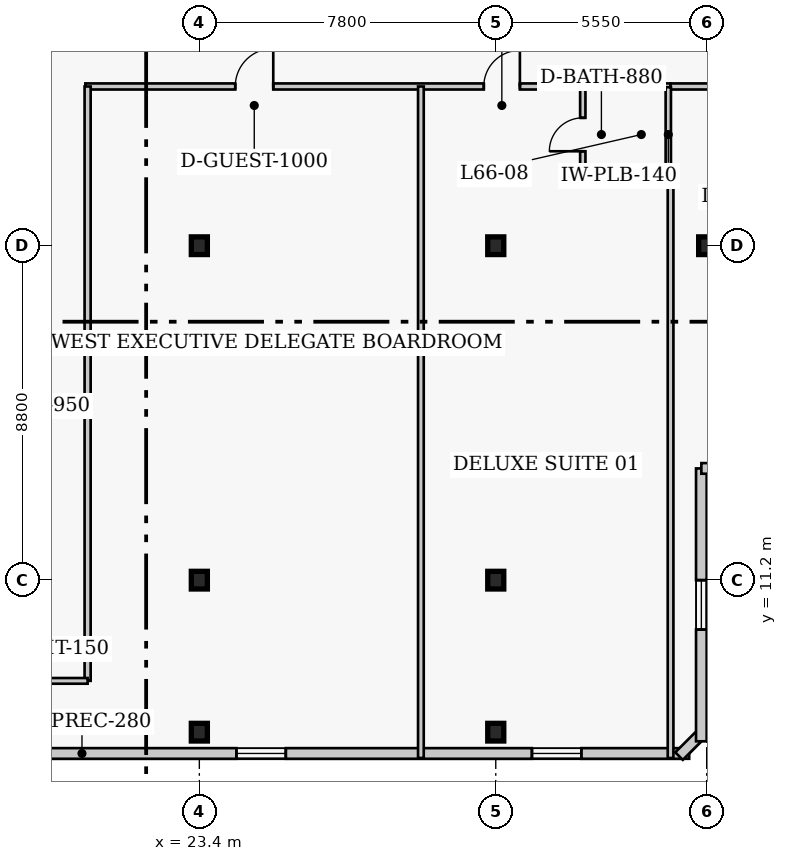
"""IFC4 building model, lengths in metres.
Left out: names, types, materials, properties, quantities, classifications, styles, units other than length and angle.
Written with IfcOpenShell. Run it as: python <this file> out.ifc"""

import sys

from ifc_helpers import new_model, si_unit, direction, frame, frame_2d, origin, origin_2d, place, context, subcontext, project, spatial, rectangle, i_section, extrude, element, fill, save


model = new_model("IFC4")
c1 = context("Model", 3, precision=1e-05, world=origin(), true_north=direction((0.0, 1.0)))
c2 = subcontext(c1, "Body", "Model", "MODEL_VIEW")
j1 = project(units=[si_unit("LENGTHUNIT", "METRE"), si_unit("PLANEANGLEUNIT", "RADIAN")], contexts=[c1])
p1 = place(None, origin())
s1 = spatial("IfcSite", under=j1, at=p1, CompositionType="ELEMENT")
p2 = place(p1, origin())
s2 = spatial("IfcBuilding", under=s1, at=p2, CompositionType="ELEMENT")
p3 = place(p2, frame((0.0, 0.0, 265.4)))
s3 = spatial("IfcBuildingStorey", under=s2, at=p3, CompositionType="ELEMENT", Elevation=265.4)
for number, where, z_axis, x_axis in (
    (1, (23.4, 11.2, 0.0), (0.0, 0.0, 1.0), (1.0, 0.0, 0.0)),
    (2, (23.4, 20.0, 0.0), (0.0, 0.0, 1.0), (1.0, 0.0, 0.0)),
    (3, (31.2, 11.2, 0.0), (0.0, 0.0, 1.0), (1.0, 0.0, 0.0)),
    (4, (31.2, 20.0, 0.0), (0.0, 0.0, 1.0), (1.0, 0.0, 0.0)),
    (5, (36.75, 20.0, 0.0), (0.0, 0.0, 1.0), (1.0, 0.0, 0.0)),
    (6, (23.4, 7.2, 0.0), (0.0, 0.0, 1.0), (1.0, 0.0, 0.0)),
    (7, (31.2, 7.2, 0.0), (0.0, 0.0, 1.0), (1.0, 0.0, 0.0)),
):
    element("IfcColumn", number, at=place(p3, frame(where, z_axis=z_axis, x_axis=x_axis)), inside=s3, PredefinedType="COLUMN", context=c2, shape_type="SweptSolid", body=[
        extrude(i_section(OverallWidth=0.422, OverallDepth=0.465, WebThickness=0.045, FlangeThickness=0.073, FilletRadius=0.017, at=origin_2d()), origin(), (0.0, 0.0, 1.0), 4.0),
    ])
p4 = place(p3, frame((11.46, 6.64, 0.0), z_axis=(0.0, 0.0, 1.0), x_axis=(1.0, 0.0, 0.0)))
e8 = element("IfcWall", 8, at=p4, inside=s3, PredefinedType="SOLIDWALL", context=c2, shape_type="SweptSolid", body=[
    extrude(rectangle(XDim=24.83, YDim=0.28, at=frame_2d((12.415, 0.0))), origin(), (0.0, 0.0, 1.0), 3.76),
])
p5 = place(p4, frame((3.488, 0.0, 0.85)))
e9 = element("IfcOpeningElement", 9, at=p5, cuts=e8, PredefinedType="OPENING", context=c2, shape_type="SweptSolid", body=[
    extrude(rectangle(XDim=1.3, YDim=1.7, at=frame_2d((0.65, 0.85))), frame((0.0, 0.15, 0.0), z_axis=(0.0, -1.0, 0.0), x_axis=(1.0, 0.0, 0.0)), (0.0, 0.0, 1.0), 0.3),
])
p6 = place(p4, frame((12.915, 0.0, 0.85)))
e10 = element("IfcOpeningElement", 10, at=p6, cuts=e8, PredefinedType="OPENING", context=c2, shape_type="SweptSolid", body=[
    extrude(rectangle(XDim=1.3, YDim=1.7, at=frame_2d((0.65, 0.85))), frame((0.0, 0.15, 0.0), z_axis=(0.0, -1.0, 0.0), x_axis=(1.0, 0.0, 0.0)), (0.0, 0.0, 1.0), 0.3),
])
p7 = place(p4, frame((20.692, 0.0, 0.85)))
e11 = element("IfcOpeningElement", 11, at=p7, cuts=e8, PredefinedType="OPENING", context=c2, shape_type="SweptSolid", body=[
    extrude(rectangle(XDim=1.3, YDim=1.7, at=frame_2d((0.65, 0.85))), frame((0.0, 0.15, 0.0), z_axis=(0.0, -1.0, 0.0), x_axis=(1.0, 0.0, 0.0)), (0.0, 0.0, 1.0), 0.3),
])
p8 = place(p3, frame((36.023, 6.571, 0.0), z_axis=(0.0, 0.0, 1.0), x_axis=(0.707106781187, 0.707106781187, 0.0)))
e12 = element("IfcWall", 12, at=p8, inside=s3, PredefinedType="SOLIDWALL", context=c2, shape_type="SweptSolid", body=[
    extrude(rectangle(XDim=0.928, YDim=0.28, at=frame_2d((0.464, 0.0))), origin(), (0.0, 0.0, 1.0), 3.76),
])
p9 = place(p3, frame((36.61, 6.96, 0.0), z_axis=(0.0, 0.0, 1.0), x_axis=(0.0, 1.0, 0.0)))
e13 = element("IfcWall", 13, at=p9, inside=s3, PredefinedType="SOLIDWALL", context=c2, shape_type="SweptSolid", body=[
    extrude(rectangle(XDim=7.18, YDim=0.28, at=frame_2d((3.59, 0.0))), origin(), (0.0, 0.0, 1.0), 3.76),
])
p10 = place(p9, frame((2.94, 0.0, 0.85)))
e14 = element("IfcOpeningElement", 14, at=p10, cuts=e13, PredefinedType="OPENING", context=c2, shape_type="SweptSolid", body=[
    extrude(rectangle(XDim=1.3, YDim=1.7, at=frame_2d((0.65, 0.85))), frame((0.0, 0.15, 0.0), z_axis=(0.0, -1.0, 0.0), x_axis=(1.0, 0.0, 0.0)), (0.0, 0.0, 1.0), 0.3),
])
p11 = place(p3, frame((36.61, 14.14, 0.0), z_axis=(0.0, 0.0, 1.0), x_axis=(1.0, 0.0, 0.0)))
e15 = element("IfcWall", 15, at=p11, inside=s3, PredefinedType="SOLIDWALL", context=c2, shape_type="SweptSolid", body=[
    extrude(rectangle(XDim=4.78, YDim=0.28, at=frame_2d((2.39, 0.0))), origin(), (0.0, 0.0, 1.0), 3.76),
])
p12 = place(p11, frame((1.74, 0.0, 0.85)))
e16 = element("IfcOpeningElement", 16, at=p12, cuts=e15, PredefinedType="OPENING", context=c2, shape_type="SweptSolid", body=[
    extrude(rectangle(XDim=1.3, YDim=1.7, at=frame_2d((0.65, 0.85))), frame((0.0, 0.15, 0.0), z_axis=(0.0, -1.0, 0.0), x_axis=(1.0, 0.0, 0.0)), (0.0, 0.0, 1.0), 0.3),
])
p13 = place(p3, frame((20.4, 24.19, 0.0), z_axis=(0.0, 0.0, 1.0), x_axis=(1.0, 0.0, 0.0)))
e17 = element("IfcWall", 17, at=p13, inside=s3, PredefinedType="PARTITIONING", context=c2, shape_type="SweptSolid", body=[
    extrude(rectangle(XDim=15.4, YDim=0.16, at=frame_2d((7.7, 0.0))), origin(), (0.0, 0.0, 1.0), 3.76),
])
p14 = place(p13, frame((3.945, 0.0, 0.0)))
e18 = element("IfcOpeningElement", 18, at=p14, cuts=e17, PredefinedType="OPENING", context=c2, shape_type="SweptSolid", body=[
    extrude(rectangle(XDim=1.0, YDim=2.15, at=frame_2d((0.5, 1.075))), frame((0.0, 0.09, 0.0), z_axis=(0.0, -1.0, 0.0), x_axis=(1.0, 0.0, 0.0)), (0.0, 0.0, 1.0), 0.18),
])
p15 = place(p13, frame((10.485, 0.0, 0.0)))
e19 = element("IfcOpeningElement", 19, at=p15, cuts=e17, PredefinedType="OPENING", context=c2, shape_type="SweptSolid", body=[
    extrude(rectangle(XDim=0.95, YDim=2.1, at=frame_2d((0.475, 1.05))), frame((0.0, 0.09, 0.0), z_axis=(0.0, -1.0, 0.0), x_axis=(1.0, 0.0, 0.0)), (0.0, 0.0, 1.0), 0.18),
])
p16 = place(p3, frame((35.8, 24.19, 0.0), z_axis=(0.0, 0.0, 1.0), x_axis=(1.0, 0.0, 0.0)))
e20 = element("IfcWall", 20, at=p16, inside=s3, PredefinedType="PARTITIONING", context=c2, shape_type="SweptSolid", body=[
    extrude(rectangle(XDim=24.81, YDim=0.16, at=frame_2d((12.405, 0.0))), origin(), (0.0, 0.0, 1.0), 3.76),
])
p17 = place(p16, frame((2.115, 0.0, 0.0)))
e21 = element("IfcOpeningElement", 21, at=p17, cuts=e20, PredefinedType="OPENING", context=c2, shape_type="SweptSolid", body=[
    extrude(rectangle(XDim=0.95, YDim=2.1, at=frame_2d((0.475, 1.05))), frame((0.0, 0.09, 0.0), z_axis=(0.0, -1.0, 0.0), x_axis=(1.0, 0.0, 0.0)), (0.0, 0.0, 1.0), 0.18),
])
p18 = place(p16, frame((11.345, 0.0, 0.0)))
e22 = element("IfcOpeningElement", 22, at=p18, cuts=e20, PredefinedType="OPENING", context=c2, shape_type="SweptSolid", body=[
    extrude(rectangle(XDim=1.0, YDim=2.15, at=frame_2d((0.5, 1.075))), frame((0.0, 0.09, 0.0), z_axis=(0.0, -1.0, 0.0), x_axis=(1.0, 0.0, 0.0)), (0.0, 0.0, 1.0), 0.18),
])
p19 = place(p16, frame((17.47, 0.0, 0.0)))
e23 = element("IfcOpeningElement", 23, at=p19, cuts=e20, PredefinedType="OPENING", context=c2, shape_type="SweptSolid", body=[
    extrude(rectangle(XDim=0.95, YDim=2.1, at=frame_2d((0.475, 1.05))), frame((0.0, 0.09, 0.0), z_axis=(0.0, -1.0, 0.0), x_axis=(1.0, 0.0, 0.0)), (0.0, 0.0, 1.0), 0.18),
])
p20 = place(p16, frame((23.265, 0.0, 0.0)))
e24 = element("IfcOpeningElement", 24, at=p20, cuts=e20, PredefinedType="OPENING", context=c2, shape_type="SweptSolid", body=[
    extrude(rectangle(XDim=0.95, YDim=2.1, at=frame_2d((0.475, 1.05))), frame((0.0, 0.09, 0.0), z_axis=(0.0, -1.0, 0.0), x_axis=(1.0, 0.0, 0.0)), (0.0, 0.0, 1.0), 0.18),
])
p21 = place(p3, frame((20.46, 8.55, 0.0), z_axis=(0.0, 0.0, 1.0), x_axis=(0.0, 1.0, 0.0)))
e25 = element("IfcWall", 25, at=p21, inside=s3, PredefinedType="PARTITIONING", context=c2, shape_type="SweptSolid", body=[
    extrude(rectangle(XDim=15.64, YDim=0.16, at=frame_2d((7.82, 0.0))), origin(), (0.0, 0.0, 1.0), 3.76),
])
p22 = place(p3, frame((18.24, 8.55, 0.0), z_axis=(0.0, 0.0, 1.0), x_axis=(1.0, 0.0, 0.0)))
e26 = element("IfcWall", 26, at=p22, inside=s3, PredefinedType="PARTITIONING", context=c2, shape_type="SweptSolid", body=[
    extrude(rectangle(XDim=2.22, YDim=0.15, at=frame_2d((1.11, 0.0))), origin(), (0.0, 0.0, 1.0), 3.76),
])
p23 = place(p3, frame((29.23, 6.52, 0.0), z_axis=(0.0, 0.0, 1.0), x_axis=(0.0, 1.0, 0.0)))
e27 = element("IfcWall", 27, at=p23, inside=s3, PredefinedType="PARTITIONING", context=c2, shape_type="SweptSolid", body=[
    extrude(rectangle(XDim=17.67, YDim=0.15, at=frame_2d((8.835, 0.0))), origin(), (0.0, 0.0, 1.0), 3.76),
])
p24 = place(p3, frame((33.49, 21.68, 0.0), z_axis=(0.0, 0.0, 1.0), x_axis=(0.0, 1.0, 0.0)))
e28 = element("IfcWall", 28, at=p24, inside=s3, PredefinedType="PLUMBINGWALL", context=c2, shape_type="SweptSolid", body=[
    extrude(rectangle(XDim=2.49, YDim=0.14, at=frame_2d((1.245, 0.0))), origin(), (0.0, 0.0, 1.0), 3.76),
])
p25 = place(p24, frame((0.805, 0.0, 0.0)))
e29 = element("IfcOpeningElement", 29, at=p25, cuts=e28, PredefinedType="OPENING", context=c2, shape_type="SweptSolid", body=[
    extrude(rectangle(XDim=0.88, YDim=2.05, at=frame_2d((0.44, 1.025))), frame((0.0, 0.08, 0.0), z_axis=(0.0, -1.0, 0.0), x_axis=(1.0, 0.0, 0.0)), (0.0, 0.0, 1.0), 0.16),
])
p26 = place(p3, frame((35.74, 21.68, 0.0), z_axis=(0.0, 0.0, 1.0), x_axis=(0.0, 1.0, 0.0)))
e30 = element("IfcWall", 30, at=p26, inside=s3, PredefinedType="PLUMBINGWALL", context=c2, shape_type="SweptSolid", body=[
    extrude(rectangle(XDim=2.49, YDim=0.14, at=frame_2d((1.245, 0.0))), origin(), (0.0, 0.0, 1.0), 3.76),
])
p27 = place(p3, frame((33.49, 21.68, 0.0), z_axis=(0.0, 0.0, 1.0), x_axis=(1.0, 0.0, 0.0)))
e31 = element("IfcWall", 31, at=p27, inside=s3, PredefinedType="PLUMBINGWALL", context=c2, shape_type="SweptSolid", body=[
    extrude(rectangle(XDim=2.25, YDim=0.14, at=frame_2d((1.125, 0.0))), origin(), (0.0, 0.0, 1.0), 3.76),
])
p28 = place(p3, frame((35.8, 6.52, 0.0), z_axis=(0.0, 0.0, 1.0), x_axis=(0.0, 1.0, 0.0)))
e32 = element("IfcWall", 32, at=p28, inside=s3, PredefinedType="PARTITIONING", context=c2, shape_type="SweptSolid", body=[
    extrude(rectangle(XDim=15.16, YDim=0.15, at=frame_2d((7.58, 0.0))), origin(), (0.0, 0.0, 1.0), 3.76),
])
p29 = place(p6, origin())
e33 = element("IfcWindow", 33, at=p29, inside=s3, PartitioningType="SINGLE_PANEL", PredefinedType="WINDOW", context=c2, shape_type="SweptSolid", body=[
    extrude(rectangle(XDim=1.3, YDim=1.7, at=frame_2d((0.65, 0.85))), frame((0.0, 0.03, 0.0), z_axis=(0.0, -1.0, 0.0), x_axis=(1.0, 0.0, 0.0)), (0.0, 0.0, 1.0), 0.06),
])
fill(e10, e33)
p30 = place(p7, origin())
e34 = element("IfcWindow", 34, at=p30, inside=s3, PartitioningType="SINGLE_PANEL", PredefinedType="WINDOW", context=c2, shape_type="SweptSolid", body=[
    extrude(rectangle(XDim=1.3, YDim=1.7, at=frame_2d((0.65, 0.85))), frame((0.0, 0.03, 0.0), z_axis=(0.0, -1.0, 0.0), x_axis=(1.0, 0.0, 0.0)), (0.0, 0.0, 1.0), 0.06),
])
fill(e11, e34)
p31 = place(p10, origin())
e35 = element("IfcWindow", 35, at=p31, inside=s3, PartitioningType="SINGLE_PANEL", PredefinedType="WINDOW", context=c2, shape_type="SweptSolid", body=[
    extrude(rectangle(XDim=1.3, YDim=1.7, at=frame_2d((0.65, 0.85))), frame((0.0, 0.03, 0.0), z_axis=(0.0, -1.0, 0.0), x_axis=(1.0, 0.0, 0.0)), (0.0, 0.0, 1.0), 0.06),
])
fill(e14, e35)
p32 = place(p14, origin())
e36 = element("IfcDoor", 36, at=p32, inside=s3, OperationType="SINGLE_SWING_RIGHT", PredefinedType="DOOR", context=c2, shape_type="SweptSolid", body=[
    extrude(rectangle(XDim=1.0, YDim=2.15, at=frame_2d((0.5, 1.075))), frame((0.0, 0.025, 0.0), z_axis=(0.0, -1.0, 0.0), x_axis=(1.0, 0.0, 0.0)), (0.0, 0.0, 1.0), 0.05),
])
fill(e18, e36)
p33 = place(p25, origin())
e37 = element("IfcDoor", 37, at=p33, inside=s3, OperationType="SINGLE_SWING_LEFT", PredefinedType="DOOR", context=c2, shape_type="SweptSolid", body=[
    extrude(rectangle(XDim=0.88, YDim=2.05, at=frame_2d((0.44, 1.025))), frame((0.0, 0.025, 0.0), z_axis=(0.0, -1.0, 0.0), x_axis=(1.0, 0.0, 0.0)), (0.0, 0.0, 1.0), 0.05),
])
fill(e29, e37)
p34 = place(p15, origin())
e38 = element("IfcDoor", 38, at=p34, inside=s3, OperationType="SINGLE_SWING_RIGHT", PredefinedType="DOOR", context=c2, shape_type="SweptSolid", body=[
    extrude(rectangle(XDim=0.95, YDim=2.1, at=frame_2d((0.475, 1.05))), frame((0.0, 0.025, 0.0), z_axis=(0.0, -1.0, 0.0), x_axis=(1.0, 0.0, 0.0)), (0.0, 0.0, 1.0), 0.05),
])
fill(e19, e38)
save(model, sys.argv[1])
